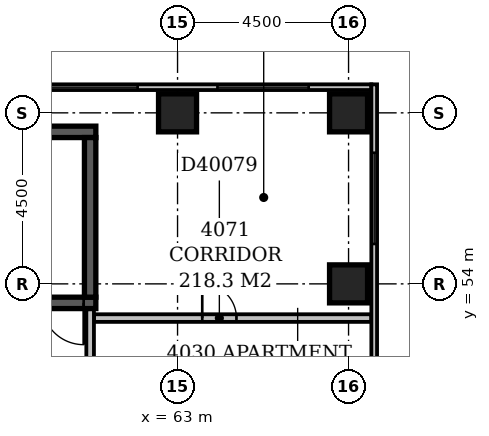
"""IFC4 building model, lengths in metres.
Left out: names, types, materials, properties, quantities, classifications, styles, units other than length and angle.
Written with IfcOpenShell. Run it as: python <this file> out.ifc"""

import sys

from ifc_helpers import new_model, si_unit, direction, frame, frame_2d, origin, origin_2d, place, context, subcontext, project, spatial, rectangle, extrude, element, fill, save


model = new_model("IFC4")
c1 = context("Model", 3, precision=1e-05, world=origin(), true_north=direction((0.0, 1.0)))
c2 = subcontext(c1, "Body", "Model", "MODEL_VIEW")
j1 = project(units=[si_unit("LENGTHUNIT", "METRE"), si_unit("PLANEANGLEUNIT", "RADIAN")], contexts=[c1])
p1 = place(None, origin())
s1 = spatial("IfcSite", under=j1, at=p1, CompositionType="ELEMENT")
p2 = place(p1, origin())
s2 = spatial("IfcBuilding", under=s1, at=p2, CompositionType="ELEMENT")
p3 = place(p2, frame((0.0, 0.0, 159.2)))
s3 = spatial("IfcBuildingStorey", under=s2, at=p3, CompositionType="ELEMENT", Elevation=159.2)
p4 = place(p3, frame((53.85, 53.5, -0.3), z_axis=(0.0, 0.0, 1.0), x_axis=(1.0, 0.0, 0.0)))
e1 = element("IfcWall", 1, at=p4, inside=s3, PredefinedType="SHEAR", context=c2, shape_type="SweptSolid", body=[
    extrude(rectangle(XDim=7.0, YDim=0.3, at=frame_2d((3.5, 0.0))), origin(), (0.0, 0.0, 1.0), 3.6),
])
p5 = place(p4, frame((5.58, 0.0, 0.3)))
e2 = element("IfcOpeningElement", 2, at=p5, cuts=e1, PredefinedType="OPENING", context=c2, shape_type="SweptSolid", body=[
    extrude(rectangle(XDim=1.1, YDim=2.1, at=frame_2d((0.55, 1.05))), frame((0.0, 0.162, 0.0), z_axis=(0.0, -1.0, 0.0), x_axis=(1.0, 0.0, 0.0)), (0.0, 0.0, 1.0), 0.324),
])
p6 = place(p3, frame((53.85, 58.0, -0.3), z_axis=(0.0, 0.0, 1.0), x_axis=(1.0, 0.0, 0.0)))
e3 = element("IfcWall", 3, at=p6, inside=s3, PredefinedType="SHEAR", context=c2, shape_type="SweptSolid", body=[
    extrude(rectangle(XDim=7.0, YDim=0.3, at=frame_2d((3.5, 0.0))), origin(), (0.0, 0.0, 1.0), 3.6),
])
p7 = place(p3, frame((60.7, 53.65, -0.3), z_axis=(0.0, 0.0, 1.0), x_axis=(0.0, 1.0, 0.0)))
e4 = element("IfcWall", 4, at=p7, inside=s3, PredefinedType="SHEAR", context=c2, shape_type="SweptSolid", body=[
    extrude(rectangle(XDim=4.2, YDim=0.3, at=frame_2d((2.1, 0.0))), origin(), (0.0, 0.0, 1.0), 3.6),
])
for number, where, z_axis, x_axis in (
    (5, (67.5, 54.0, -0.3), (0.0, 0.0, 1.0), (1.0, 0.0, 0.0)),
    (6, (63.0, 58.5, -0.3), (0.0, 0.0, 1.0), (1.0, 0.0, 0.0)),
    (7, (67.5, 58.5, -0.3), (0.0, 0.0, 1.0), (1.0, 0.0, 0.0)),
):
    element("IfcColumn", number, at=place(p3, frame(where, z_axis=z_axis, x_axis=x_axis)), inside=s3, PredefinedType="COLUMN", context=c2, shape_type="SweptSolid", body=[
        extrude(rectangle(XDim=1.0, YDim=1.0, at=origin_2d()), origin(), (0.0, 0.0, 1.0), 3.6),
    ])
p8 = place(p3, frame((68.175, 35.4, 0.0), z_axis=(0.0, 0.0, 1.0), x_axis=(0.0, 1.0, 0.0)))
e8 = element("IfcWall", 8, at=p8, inside=s3, PredefinedType="STANDARD", context=c2, shape_type="SweptSolid", body=[
    extrude(rectangle(XDim=23.85, YDim=0.15, at=frame_2d((11.925, 0.0))), origin(), (0.0, 0.0, 1.0), 2.7),
])
p9 = place(p8, frame((1.65, 0.0, 0.6)))
e9 = element("IfcOpeningElement", 9, at=p9, cuts=e8, PredefinedType="OPENING", context=c2, shape_type="SweptSolid", body=[
    extrude(rectangle(XDim=2.4, YDim=1.8, at=frame_2d((1.2, 0.9))), frame((0.0, 0.087, 0.0), z_axis=(0.0, -1.0, 0.0), x_axis=(1.0, 0.0, 0.0)), (0.0, 0.0, 1.0), 0.174),
])
p10 = place(p8, frame((19.65, 0.0, 0.6)))
e10 = element("IfcOpeningElement", 10, at=p10, cuts=e8, PredefinedType="OPENING", context=c2, shape_type="SweptSolid", body=[
    extrude(rectangle(XDim=2.4, YDim=1.8, at=frame_2d((1.2, 0.9))), frame((0.0, 0.087, 0.0), z_axis=(0.0, -1.0, 0.0), x_axis=(1.0, 0.0, 0.0)), (0.0, 0.0, 1.0), 0.174),
])
p11 = place(p3, frame((68.1, 59.175, 0.0), z_axis=(0.0, 0.0, 1.0), x_axis=(-1.0, 0.0, 0.0)))
e11 = element("IfcWall", 11, at=p11, inside=s3, PredefinedType="STANDARD", context=c2, shape_type="SweptSolid", body=[
    extrude(rectangle(XDim=68.85, YDim=0.15, at=frame_2d((34.425, 0.0))), origin(), (0.0, 0.0, 1.0), 2.7),
])
p12 = place(p11, frame((1.65, 0.0, 0.6)))
e12 = element("IfcOpeningElement", 12, at=p12, cuts=e11, PredefinedType="OPENING", context=c2, shape_type="SweptSolid", body=[
    extrude(rectangle(XDim=2.4, YDim=1.8, at=frame_2d((1.2, 0.9))), frame((0.0, 0.087, 0.0), z_axis=(0.0, -1.0, 0.0), x_axis=(1.0, 0.0, 0.0)), (0.0, 0.0, 1.0), 0.174),
])
p13 = place(p11, frame((6.15, 0.0, 0.6)))
e13 = element("IfcOpeningElement", 13, at=p13, cuts=e11, PredefinedType="OPENING", context=c2, shape_type="SweptSolid", body=[
    extrude(rectangle(XDim=2.4, YDim=1.8, at=frame_2d((1.2, 0.9))), frame((0.0, 0.087, 0.0), z_axis=(0.0, -1.0, 0.0), x_axis=(1.0, 0.0, 0.0)), (0.0, 0.0, 1.0), 0.174),
])
p14 = place(p11, frame((37.685, 0.0, 0.6)))
e14 = element("IfcOpeningElement", 14, at=p14, cuts=e11, PredefinedType="OPENING", context=c2, shape_type="SweptSolid", body=[
    extrude(rectangle(XDim=1.5, YDim=1.8, at=frame_2d((0.75, 0.9))), frame((0.0, 0.087, 0.0), z_axis=(0.0, -1.0, 0.0), x_axis=(1.0, 0.0, 0.0)), (0.0, 0.0, 1.0), 0.174),
])
p15 = place(p3, frame((60.7, 51.6, 0.0), z_axis=(0.0, 0.0, 1.0), x_axis=(0.0, 1.0, 0.0)))
e15 = element("IfcWall", 15, at=p15, inside=s3, PredefinedType="PARTITIONING", context=c2, shape_type="SweptSolid", body=[
    extrude(rectangle(XDim=1.73, YDim=0.2, at=frame_2d((0.865, 0.0))), origin(), (0.0, 0.0, 1.0), 3.3),
])
p16 = place(p3, frame((60.8, 53.1, 0.0), z_axis=(0.0, 0.0, 1.0), x_axis=(1.0, 0.0, 0.0)))
e16 = element("IfcWall", 16, at=p16, inside=s3, PredefinedType="PARTITIONING", context=c2, shape_type="SweptSolid", body=[
    extrude(rectangle(XDim=7.3, YDim=0.2, at=frame_2d((3.65, 0.0))), origin(), (0.0, 0.0, 1.0), 3.3),
])
p17 = place(p16, frame((2.85, 0.0, 0.0)))
e17 = element("IfcOpeningElement", 17, at=p17, cuts=e16, PredefinedType="OPENING", context=c2, shape_type="SweptSolid", body=[
    extrude(rectangle(XDim=0.9, YDim=2.1, at=frame_2d((0.45, 1.05))), frame((0.0, 0.112, 0.0), z_axis=(0.0, -1.0, 0.0), x_axis=(1.0, 0.0, 0.0)), (0.0, 0.0, 1.0), 0.224),
])
p18 = place(p10, origin())
e18 = element("IfcWindow", 18, at=p18, inside=s3, PartitioningType="SINGLE_PANEL", PredefinedType="WINDOW", context=c2, shape_type="SweptSolid", body=[
    extrude(rectangle(XDim=2.4, YDim=1.8, at=frame_2d((1.2, 0.9))), frame((0.0, 0.03, 0.0), z_axis=(0.0, -1.0, 0.0), x_axis=(1.0, 0.0, 0.0)), (0.0, 0.0, 1.0), 0.06),
])
fill(e10, e18)
p19 = place(p12, origin())
e19 = element("IfcWindow", 19, at=p19, inside=s3, PartitioningType="SINGLE_PANEL", PredefinedType="WINDOW", context=c2, shape_type="SweptSolid", body=[
    extrude(rectangle(XDim=2.4, YDim=1.8, at=frame_2d((1.2, 0.9))), frame((0.0, 0.03, 0.0), z_axis=(0.0, -1.0, 0.0), x_axis=(1.0, 0.0, 0.0)), (0.0, 0.0, 1.0), 0.06),
])
fill(e12, e19)
p20 = place(p13, origin())
e20 = element("IfcWindow", 20, at=p20, inside=s3, PartitioningType="SINGLE_PANEL", PredefinedType="WINDOW", context=c2, shape_type="SweptSolid", body=[
    extrude(rectangle(XDim=2.4, YDim=1.8, at=frame_2d((1.2, 0.9))), frame((0.0, 0.03, 0.0), z_axis=(0.0, -1.0, 0.0), x_axis=(1.0, 0.0, 0.0)), (0.0, 0.0, 1.0), 0.06),
])
fill(e13, e20)
p21 = place(p5, origin())
e21 = element("IfcDoor", 21, at=p21, inside=s3, OperationType="SINGLE_SWING_RIGHT", PredefinedType="DOOR", context=c2, shape_type="SweptSolid", body=[
    extrude(rectangle(XDim=1.1, YDim=2.1, at=frame_2d((0.55, 1.05))), frame((0.0, 0.025, 0.0), z_axis=(0.0, -1.0, 0.0), x_axis=(1.0, 0.0, 0.0)), (0.0, 0.0, 1.0), 0.05),
])
fill(e2, e21)
p22 = place(p17, origin())
e22 = element("IfcDoor", 22, at=p22, inside=s3, OperationType="SINGLE_SWING_LEFT", PredefinedType="DOOR", context=c2, shape_type="SweptSolid", body=[
    extrude(rectangle(XDim=0.9, YDim=2.1, at=frame_2d((0.45, 1.05))), frame((0.0, 0.025, 0.0), z_axis=(0.0, -1.0, 0.0), x_axis=(1.0, 0.0, 0.0)), (0.0, 0.0, 1.0), 0.05),
])
fill(e17, e22)
save(model, sys.argv[1])
